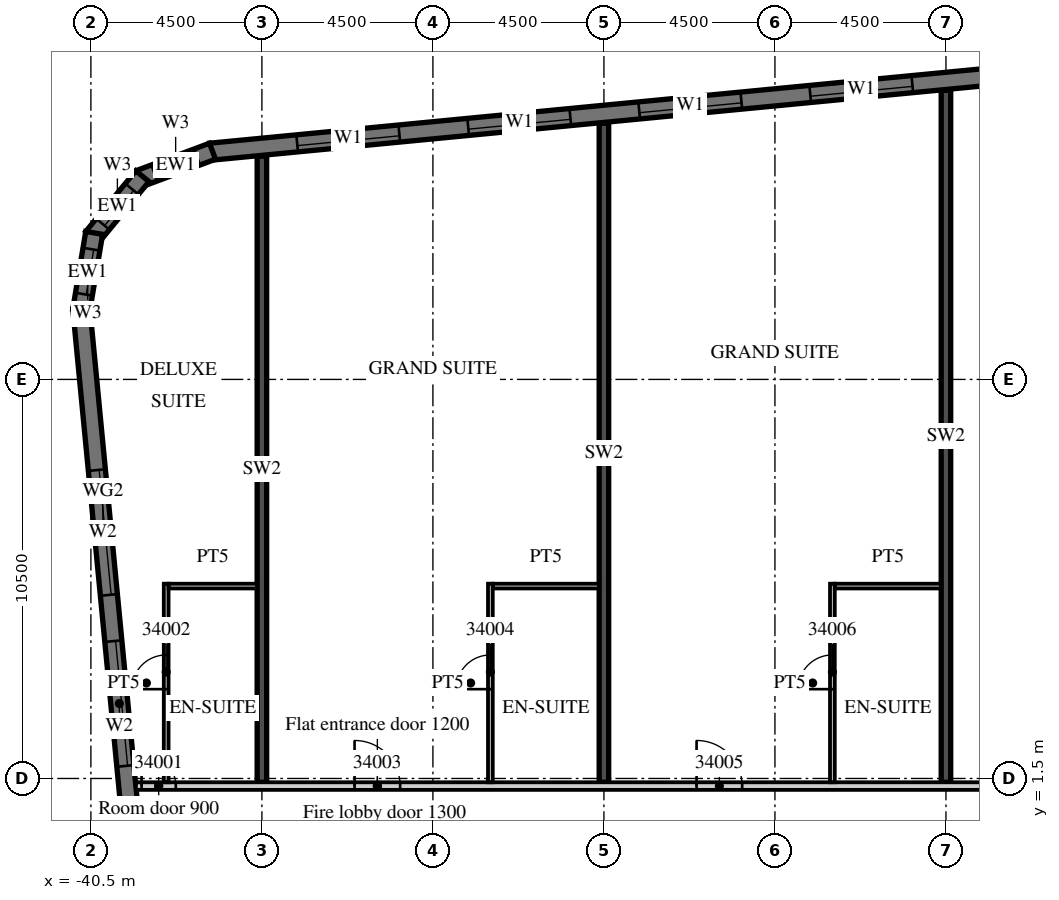
"""IFC4 building model, lengths in metres.
Left out: names, types, materials, properties, quantities, classifications, styles, units other than length and angle.
Written with IfcOpenShell. Run it as: python <this file> out.ifc"""

import sys

from ifc_helpers import new_model, si_unit, direction, frame, frame_2d, origin, place, context, subcontext, project, spatial, polyline, rectangle, outline, extrude, element, fill, save


model = new_model("IFC4")
c1 = context("Model", 3, precision=1e-05, world=origin(), true_north=direction((0.0, 1.0)))
c2 = subcontext(c1, "Body", "Model", "MODEL_VIEW")
j1 = project(units=[si_unit("LENGTHUNIT", "METRE"), si_unit("PLANEANGLEUNIT", "RADIAN")], contexts=[c1])
p1 = place(None, origin())
s1 = spatial("IfcSite", under=j1, at=p1, CompositionType="ELEMENT")
p2 = place(p1, origin())
s2 = spatial("IfcBuilding", under=s1, at=p2, CompositionType="ELEMENT")
p3 = place(p2, frame((0.0, 0.0, 147.1)))
s3 = spatial("IfcBuildingStorey", under=s2, at=p3, CompositionType="ELEMENT", Elevation=147.1)
p4 = place(p3, frame((-36.0, 1.4, 0.0), z_axis=(0.0, 0.0, 1.0), x_axis=(0.0, 1.0, 0.0)))
e1 = element("IfcWall", 1, at=p4, inside=s3, PredefinedType="SHEAR", context=c2, shape_type="SweptSolid", body=[
    extrude(rectangle(XDim=16.474, YDim=0.25, at=frame_2d((8.237, 0.0))), origin(), (0.0, 0.0, 1.0), 3.0),
])
p5 = place(p3, frame((-27.0, 1.4, 0.0), z_axis=(0.0, 0.0, 1.0), x_axis=(0.0, 1.0, 0.0)))
e2 = element("IfcWall", 2, at=p5, inside=s3, PredefinedType="SHEAR", context=c2, shape_type="SweptSolid", body=[
    extrude(rectangle(XDim=17.34, YDim=0.25, at=frame_2d((8.67, 0.0))), origin(), (0.0, 0.0, 1.0), 3.0),
])
p6 = place(p3, frame((-18.0, 1.4, 0.0), z_axis=(0.0, 0.0, 1.0), x_axis=(0.0, 1.0, 0.0)))
e3 = element("IfcWall", 3, at=p6, inside=s3, PredefinedType="SHEAR", context=c2, shape_type="SweptSolid", body=[
    extrude(rectangle(XDim=18.207, YDim=0.25, at=frame_2d((9.104, 0.0))), origin(), (0.0, 0.0, 1.0), 3.0),
])
p7 = place(p3, frame((-40.753, 13.872, 0.0), z_axis=(0.0, 0.0, 1.0), x_axis=(0.095843327381, -0.995396431878, 0.0)))
e4 = element("IfcWall", 4, at=p7, inside=s3, PredefinedType="SOLIDWALL", context=c2, shape_type="SweptSolid", body=[
    extrude(rectangle(XDim=35.0, YDim=0.45, at=frame_2d((17.5, 0.0))), origin(), (0.0, 0.0, 1.0), 3.0),
])
p8 = place(p7, frame((4.277, 0.0, 0.45)))
e5 = element("IfcOpeningElement", 5, at=p8, cuts=e4, PredefinedType="OPENING", context=c2, shape_type="SweptSolid", body=[
    extrude(rectangle(XDim=3.3, YDim=2.25, at=frame_2d((1.65, 1.125))), frame((0.0, 0.235, 0.0), z_axis=(0.0, -1.0, 0.0), x_axis=(1.0, 0.0, 0.0)), (0.0, 0.0, 1.0), 0.47),
])
p9 = place(p7, frame((8.798, 0.0, 0.45)))
e6 = element("IfcOpeningElement", 6, at=p9, cuts=e4, PredefinedType="OPENING", context=c2, shape_type="SweptSolid", body=[
    extrude(rectangle(XDim=3.3, YDim=2.25, at=frame_2d((1.65, 1.125))), frame((0.0, 0.235, 0.0), z_axis=(0.0, -1.0, 0.0), x_axis=(1.0, 0.0, 0.0)), (0.0, 0.0, 1.0), 0.47),
])
p10 = place(p3, frame((13.521, 22.89, 0.0), z_axis=(0.0, 0.0, 1.0), x_axis=(-0.995396445054, -0.095843190545, 0.0)))
e7 = element("IfcWall", 7, at=p10, inside=s3, PredefinedType="SOLIDWALL", context=c2, shape_type="SweptSolid", body=[
    extrude(rectangle(XDim=51.114, YDim=0.45, at=frame_2d((25.557, 0.0))), origin(), (0.0, 0.0, 1.0), 3.0),
])
p11 = place(p10, frame((0.91, 0.0, 0.45)))
e8 = element("IfcOpeningElement", 8, at=p11, cuts=e7, PredefinedType="OPENING", context=c2, shape_type="SweptSolid", body=[
    extrude(rectangle(XDim=2.7, YDim=2.25, at=frame_2d((1.35, 1.125))), frame((0.0, 0.235, 0.0), z_axis=(0.0, -1.0, 0.0), x_axis=(1.0, 0.0, 0.0)), (0.0, 0.0, 1.0), 0.47),
])
p12 = place(p10, frame((5.431, 0.0, 0.45)))
e9 = element("IfcOpeningElement", 9, at=p12, cuts=e7, PredefinedType="OPENING", context=c2, shape_type="SweptSolid", body=[
    extrude(rectangle(XDim=2.7, YDim=2.25, at=frame_2d((1.35, 1.125))), frame((0.0, 0.235, 0.0), z_axis=(0.0, -1.0, 0.0), x_axis=(1.0, 0.0, 0.0)), (0.0, 0.0, 1.0), 0.47),
])
p13 = place(p10, frame((9.952, 0.0, 0.45)))
e10 = element("IfcOpeningElement", 10, at=p13, cuts=e7, PredefinedType="OPENING", context=c2, shape_type="SweptSolid", body=[
    extrude(rectangle(XDim=2.7, YDim=2.25, at=frame_2d((1.35, 1.125))), frame((0.0, 0.235, 0.0), z_axis=(0.0, -1.0, 0.0), x_axis=(1.0, 0.0, 0.0)), (0.0, 0.0, 1.0), 0.47),
])
p14 = place(p10, frame((14.473, 0.0, 0.45)))
e11 = element("IfcOpeningElement", 11, at=p14, cuts=e7, PredefinedType="OPENING", context=c2, shape_type="SweptSolid", body=[
    extrude(rectangle(XDim=2.7, YDim=2.25, at=frame_2d((1.35, 1.125))), frame((0.0, 0.235, 0.0), z_axis=(0.0, -1.0, 0.0), x_axis=(1.0, 0.0, 0.0)), (0.0, 0.0, 1.0), 0.47),
])
p15 = place(p10, frame((18.994, 0.0, 0.45)))
e12 = element("IfcOpeningElement", 12, at=p15, cuts=e7, PredefinedType="OPENING", context=c2, shape_type="SweptSolid", body=[
    extrude(rectangle(XDim=2.7, YDim=2.25, at=frame_2d((1.35, 1.125))), frame((0.0, 0.235, 0.0), z_axis=(0.0, -1.0, 0.0), x_axis=(1.0, 0.0, 0.0)), (0.0, 0.0, 1.0), 0.47),
])
p16 = place(p10, frame((23.514, 0.0, 0.45)))
e13 = element("IfcOpeningElement", 13, at=p16, cuts=e7, PredefinedType="OPENING", context=c2, shape_type="SweptSolid", body=[
    extrude(rectangle(XDim=2.7, YDim=2.25, at=frame_2d((1.35, 1.125))), frame((0.0, 0.235, 0.0), z_axis=(0.0, -1.0, 0.0), x_axis=(1.0, 0.0, 0.0)), (0.0, 0.0, 1.0), 0.47),
])
p17 = place(p10, frame((28.035, 0.0, 0.45)))
e14 = element("IfcOpeningElement", 14, at=p17, cuts=e7, PredefinedType="OPENING", context=c2, shape_type="SweptSolid", body=[
    extrude(rectangle(XDim=2.7, YDim=2.25, at=frame_2d((1.35, 1.125))), frame((0.0, 0.235, 0.0), z_axis=(0.0, -1.0, 0.0), x_axis=(1.0, 0.0, 0.0)), (0.0, 0.0, 1.0), 0.47),
])
p18 = place(p10, frame((32.556, 0.0, 0.45)))
e15 = element("IfcOpeningElement", 15, at=p18, cuts=e7, PredefinedType="OPENING", context=c2, shape_type="SweptSolid", body=[
    extrude(rectangle(XDim=2.7, YDim=2.25, at=frame_2d((1.35, 1.125))), frame((0.0, 0.235, 0.0), z_axis=(0.0, -1.0, 0.0), x_axis=(1.0, 0.0, 0.0)), (0.0, 0.0, 1.0), 0.47),
])
p19 = place(p10, frame((37.077, 0.0, 0.45)))
e16 = element("IfcOpeningElement", 16, at=p19, cuts=e7, PredefinedType="OPENING", context=c2, shape_type="SweptSolid", body=[
    extrude(rectangle(XDim=2.7, YDim=2.25, at=frame_2d((1.35, 1.125))), frame((0.0, 0.235, 0.0), z_axis=(0.0, -1.0, 0.0), x_axis=(1.0, 0.0, 0.0)), (0.0, 0.0, 1.0), 0.47),
])
p20 = place(p10, frame((41.598, 0.0, 0.45)))
e17 = element("IfcOpeningElement", 17, at=p20, cuts=e7, PredefinedType="OPENING", context=c2, shape_type="SweptSolid", body=[
    extrude(rectangle(XDim=2.7, YDim=2.25, at=frame_2d((1.35, 1.125))), frame((0.0, 0.235, 0.0), z_axis=(0.0, -1.0, 0.0), x_axis=(1.0, 0.0, 0.0)), (0.0, 0.0, 1.0), 0.47),
])
p21 = place(p10, frame((46.118, 0.0, 0.45)))
e18 = element("IfcOpeningElement", 18, at=p21, cuts=e7, PredefinedType="OPENING", context=c2, shape_type="SweptSolid", body=[
    extrude(rectangle(XDim=2.7, YDim=2.25, at=frame_2d((1.35, 1.125))), frame((0.0, 0.235, 0.0), z_axis=(0.0, -1.0, 0.0), x_axis=(1.0, 0.0, 0.0)), (0.0, 0.0, 1.0), 0.47),
])
p22 = place(p3, frame((-37.3, 18.004, 0.0), z_axis=(0.0, 0.0, 1.0), x_axis=(-0.936677599948, -0.350192909346, 0.0)))
e19 = element("IfcWall", 19, at=p22, inside=s3, PredefinedType="SOLIDWALL", context=c2, shape_type="SweptSolid", body=[
    extrude(outline(polyline([(0.0, -0.225), (2.071, -0.225), (1.95, 0.225), (0.121, 0.225), (0.0, -0.225)])), origin(), (0.0, 0.0, 1.0), 3.0),
])
p23 = place(p22, frame((0.435, 0.0, 0.45)))
e20 = element("IfcOpeningElement", 20, at=p23, cuts=e19, PredefinedType="OPENING", context=c2, shape_type="SweptSolid", body=[
    extrude(rectangle(XDim=1.2, YDim=2.25, at=frame_2d((0.6, 1.125))), frame((0.0, 0.235, 0.0), z_axis=(0.0, -1.0, 0.0), x_axis=(1.0, 0.0, 0.0)), (0.0, 0.0, 1.0), 0.47),
])
p24 = place(p3, frame((-39.145, 17.347, 0.0), z_axis=(0.0, 0.0, 1.0), x_axis=(-0.636046112757, -0.771651049663, 0.0)))
e21 = element("IfcWall", 21, at=p24, inside=s3, PredefinedType="SOLIDWALL", context=c2, shape_type="SweptSolid", body=[
    extrude(outline(polyline([(0.0, -0.225), (2.071, -0.225), (1.95, 0.225), (0.121, 0.225), (0.0, -0.225)])), origin(), (0.0, 0.0, 1.0), 3.0),
])
p25 = place(p24, frame((0.435, 0.0, 0.45)))
e22 = element("IfcOpeningElement", 22, at=p25, cuts=e21, PredefinedType="OPENING", context=c2, shape_type="SweptSolid", body=[
    extrude(rectangle(XDim=1.2, YDim=2.25, at=frame_2d((0.6, 1.125))), frame((0.0, 0.235, 0.0), z_axis=(0.0, -1.0, 0.0), x_axis=(1.0, 0.0, 0.0)), (0.0, 0.0, 1.0), 0.47),
])
p26 = place(p3, frame((-40.413, 15.855, 0.0), z_axis=(0.0, 0.0, 1.0), x_axis=(-0.165068144653, -0.986282164302, 0.0)))
e23 = element("IfcWall", 23, at=p26, inside=s3, PredefinedType="SOLIDWALL", context=c2, shape_type="SweptSolid", body=[
    extrude(outline(polyline([(0.0, -0.225), (2.071, -0.225), (1.95, 0.225), (0.121, 0.225), (0.0, -0.225)])), origin(), (0.0, 0.0, 1.0), 3.0),
])
p27 = place(p26, frame((0.435, 0.0, 0.45)))
e24 = element("IfcOpeningElement", 24, at=p27, cuts=e23, PredefinedType="OPENING", context=c2, shape_type="SweptSolid", body=[
    extrude(rectangle(XDim=1.2, YDim=2.25, at=frame_2d((0.6, 1.125))), frame((0.0, 0.235, 0.0), z_axis=(0.0, -1.0, 0.0), x_axis=(1.0, 0.0, 0.0)), (0.0, 0.0, 1.0), 0.47),
])
p28 = place(p3, frame((-39.316, 1.3, 0.0), z_axis=(0.0, 0.0, 1.0), x_axis=(1.0, 0.0, 0.0)))
e25 = element("IfcWall", 25, at=p28, inside=s3, PredefinedType="PARTITIONING", context=c2, shape_type="SweptSolid", body=[
    extrude(rectangle(XDim=52.816, YDim=0.2, at=frame_2d((26.408, 0.0))), origin(), (0.0, 0.0, 1.0), 3.0),
])
p29 = place(p28, frame((0.15, 0.0, 0.0)))
e26 = element("IfcOpeningElement", 26, at=p29, cuts=e25, PredefinedType="OPENING", context=c2, shape_type="SweptSolid", body=[
    extrude(rectangle(XDim=0.9, YDim=2.1, at=frame_2d((0.45, 1.05))), frame((0.0, 0.11, 0.0), z_axis=(0.0, -1.0, 0.0), x_axis=(1.0, 0.0, 0.0)), (0.0, 0.0, 1.0), 0.22),
])
p30 = place(p28, frame((5.754, 0.0, 0.0)))
e27 = element("IfcOpeningElement", 27, at=p30, cuts=e25, PredefinedType="OPENING", context=c2, shape_type="SweptSolid", body=[
    extrude(rectangle(XDim=1.2, YDim=2.1, at=frame_2d((0.6, 1.05))), frame((0.0, 0.11, 0.0), z_axis=(0.0, -1.0, 0.0), x_axis=(1.0, 0.0, 0.0)), (0.0, 0.0, 1.0), 0.22),
])
p31 = place(p28, frame((14.754, 0.0, 0.0)))
e28 = element("IfcOpeningElement", 28, at=p31, cuts=e25, PredefinedType="OPENING", context=c2, shape_type="SweptSolid", body=[
    extrude(rectangle(XDim=1.2, YDim=2.1, at=frame_2d((0.6, 1.05))), frame((0.0, 0.11, 0.0), z_axis=(0.0, -1.0, 0.0), x_axis=(1.0, 0.0, 0.0)), (0.0, 0.0, 1.0), 0.22),
])
p32 = place(p28, frame((23.754, 0.0, 0.0)))
e29 = element("IfcOpeningElement", 29, at=p32, cuts=e25, PredefinedType="OPENING", context=c2, shape_type="SweptSolid", body=[
    extrude(rectangle(XDim=1.2, YDim=2.1, at=frame_2d((0.6, 1.05))), frame((0.0, 0.11, 0.0), z_axis=(0.0, -1.0, 0.0), x_axis=(1.0, 0.0, 0.0)), (0.0, 0.0, 1.0), 0.22),
])
p33 = place(p28, frame((35.678, 0.0, 0.0)))
e30 = element("IfcOpeningElement", 30, at=p33, cuts=e25, PredefinedType="OPENING", context=c2, shape_type="SweptSolid", body=[
    extrude(rectangle(XDim=1.2, YDim=2.1, at=frame_2d((0.6, 1.05))), frame((0.0, 0.11, 0.0), z_axis=(0.0, -1.0, 0.0), x_axis=(1.0, 0.0, 0.0)), (0.0, 0.0, 1.0), 0.22),
])
p34 = place(p28, frame((44.678, 0.0, 0.0)))
e31 = element("IfcOpeningElement", 31, at=p34, cuts=e25, PredefinedType="OPENING", context=c2, shape_type="SweptSolid", body=[
    extrude(rectangle(XDim=1.2, YDim=2.1, at=frame_2d((0.6, 1.05))), frame((0.0, 0.11, 0.0), z_axis=(0.0, -1.0, 0.0), x_axis=(1.0, 0.0, 0.0)), (0.0, 0.0, 1.0), 0.22),
])
p35 = place(p28, frame((51.241, 0.0, 0.0)))
e32 = element("IfcOpeningElement", 32, at=p35, cuts=e25, PredefinedType="OPENING", context=c2, shape_type="SweptSolid", body=[
    extrude(rectangle(XDim=1.0, YDim=2.1, at=frame_2d((0.5, 1.05))), frame((0.0, 0.11, 0.0), z_axis=(0.0, -1.0, 0.0), x_axis=(1.0, 0.0, 0.0)), (0.0, 0.0, 1.0), 0.22),
])
p36 = place(p3, frame((-38.519, 1.4, 0.0), z_axis=(0.0, 0.0, 1.0), x_axis=(0.0, 1.0, 0.0)))
e33 = element("IfcWall", 33, at=p36, inside=s3, PredefinedType="PARTITIONING", context=c2, shape_type="SweptSolid", body=[
    extrude(rectangle(XDim=5.225, YDim=0.125, at=frame_2d((2.613, 0.0))), origin(), (0.0, 0.0, 1.0), 3.0),
])
p37 = place(p36, frame((2.45, 0.0, 0.0)))
e34 = element("IfcOpeningElement", 34, at=p37, cuts=e33, PredefinedType="OPENING", context=c2, shape_type="SweptSolid", body=[
    extrude(rectangle(XDim=0.9, YDim=2.1, at=frame_2d((0.45, 1.05))), frame((0.0, 0.073, 0.0), z_axis=(0.0, -1.0, 0.0), x_axis=(1.0, 0.0, 0.0)), (0.0, 0.0, 1.0), 0.145),
])
p38 = place(p3, frame((-38.457, 6.562, 0.0), z_axis=(0.0, 0.0, 1.0), x_axis=(1.0, 0.0, 0.0)))
e35 = element("IfcWall", 35, at=p38, inside=s3, PredefinedType="PARTITIONING", context=c2, shape_type="SweptSolid", body=[
    extrude(rectangle(XDim=2.332, YDim=0.125, at=frame_2d((1.166, 0.0))), origin(), (0.0, 0.0, 1.0), 3.0),
])
p39 = place(p3, frame((-29.988, 1.4, 0.0), z_axis=(0.0, 0.0, 1.0), x_axis=(0.0, 1.0, 0.0)))
e36 = element("IfcWall", 36, at=p39, inside=s3, PredefinedType="PARTITIONING", context=c2, shape_type="SweptSolid", body=[
    extrude(rectangle(XDim=5.225, YDim=0.125, at=frame_2d((2.613, 0.0))), origin(), (0.0, 0.0, 1.0), 3.0),
])
p40 = place(p39, frame((2.45, 0.0, 0.0)))
e37 = element("IfcOpeningElement", 37, at=p40, cuts=e36, PredefinedType="OPENING", context=c2, shape_type="SweptSolid", body=[
    extrude(rectangle(XDim=0.9, YDim=2.1, at=frame_2d((0.45, 1.05))), frame((0.0, 0.073, 0.0), z_axis=(0.0, -1.0, 0.0), x_axis=(1.0, 0.0, 0.0)), (0.0, 0.0, 1.0), 0.145),
])
p41 = place(p3, frame((-29.925, 6.562, 0.0), z_axis=(0.0, 0.0, 1.0), x_axis=(1.0, 0.0, 0.0)))
e38 = element("IfcWall", 38, at=p41, inside=s3, PredefinedType="PARTITIONING", context=c2, shape_type="SweptSolid", body=[
    extrude(rectangle(XDim=2.8, YDim=0.125, at=frame_2d((1.4, 0.0))), origin(), (0.0, 0.0, 1.0), 3.0),
])
p42 = place(p3, frame((-20.988, 1.4, 0.0), z_axis=(0.0, 0.0, 1.0), x_axis=(0.0, 1.0, 0.0)))
e39 = element("IfcWall", 39, at=p42, inside=s3, PredefinedType="PARTITIONING", context=c2, shape_type="SweptSolid", body=[
    extrude(rectangle(XDim=5.225, YDim=0.125, at=frame_2d((2.613, 0.0))), origin(), (0.0, 0.0, 1.0), 3.0),
])
p43 = place(p42, frame((2.45, 0.0, 0.0)))
e40 = element("IfcOpeningElement", 40, at=p43, cuts=e39, PredefinedType="OPENING", context=c2, shape_type="SweptSolid", body=[
    extrude(rectangle(XDim=0.9, YDim=2.1, at=frame_2d((0.45, 1.05))), frame((0.0, 0.073, 0.0), z_axis=(0.0, -1.0, 0.0), x_axis=(1.0, 0.0, 0.0)), (0.0, 0.0, 1.0), 0.145),
])
p44 = place(p3, frame((-20.925, 6.562, 0.0), z_axis=(0.0, 0.0, 1.0), x_axis=(1.0, 0.0, 0.0)))
e41 = element("IfcWall", 41, at=p44, inside=s3, PredefinedType="PARTITIONING", context=c2, shape_type="SweptSolid", body=[
    extrude(rectangle(XDim=2.8, YDim=0.125, at=frame_2d((1.4, 0.0))), origin(), (0.0, 0.0, 1.0), 3.0),
])
p45 = place(p8, origin())
e42 = element("IfcWindow", 42, at=p45, inside=s3, PartitioningType="SINGLE_PANEL", PredefinedType="WINDOW", context=c2, shape_type="SweptSolid", body=[
    extrude(rectangle(XDim=3.3, YDim=2.25, at=frame_2d((1.65, 1.125))), frame((0.0, 0.09, 0.0), z_axis=(0.0, -1.0, 0.0), x_axis=(1.0, 0.0, 0.0)), (0.0, 0.0, 1.0), 0.06),
])
fill(e5, e42)
p46 = place(p9, origin())
e43 = element("IfcWindow", 43, at=p46, inside=s3, PartitioningType="SINGLE_PANEL", PredefinedType="WINDOW", context=c2, shape_type="SweptSolid", body=[
    extrude(rectangle(XDim=3.3, YDim=2.25, at=frame_2d((1.65, 1.125))), frame((0.0, 0.09, 0.0), z_axis=(0.0, -1.0, 0.0), x_axis=(1.0, 0.0, 0.0)), (0.0, 0.0, 1.0), 0.06),
])
fill(e6, e43)
p47 = place(p18, origin())
e44 = element("IfcWindow", 44, at=p47, inside=s3, PartitioningType="SINGLE_PANEL", PredefinedType="WINDOW", context=c2, shape_type="SweptSolid", body=[
    extrude(rectangle(XDim=2.7, YDim=2.25, at=frame_2d((1.35, 1.125))), frame((0.0, 0.09, 0.0), z_axis=(0.0, -1.0, 0.0), x_axis=(1.0, 0.0, 0.0)), (0.0, 0.0, 1.0), 0.06),
])
fill(e15, e44)
p48 = place(p19, origin())
e45 = element("IfcWindow", 45, at=p48, inside=s3, PartitioningType="SINGLE_PANEL", PredefinedType="WINDOW", context=c2, shape_type="SweptSolid", body=[
    extrude(rectangle(XDim=2.7, YDim=2.25, at=frame_2d((1.35, 1.125))), frame((0.0, 0.09, 0.0), z_axis=(0.0, -1.0, 0.0), x_axis=(1.0, 0.0, 0.0)), (0.0, 0.0, 1.0), 0.06),
])
fill(e16, e45)
p49 = place(p20, origin())
e46 = element("IfcWindow", 46, at=p49, inside=s3, PartitioningType="SINGLE_PANEL", PredefinedType="WINDOW", context=c2, shape_type="SweptSolid", body=[
    extrude(rectangle(XDim=2.7, YDim=2.25, at=frame_2d((1.35, 1.125))), frame((0.0, 0.09, 0.0), z_axis=(0.0, -1.0, 0.0), x_axis=(1.0, 0.0, 0.0)), (0.0, 0.0, 1.0), 0.06),
])
fill(e17, e46)
p50 = place(p21, origin())
e47 = element("IfcWindow", 47, at=p50, inside=s3, PartitioningType="SINGLE_PANEL", PredefinedType="WINDOW", context=c2, shape_type="SweptSolid", body=[
    extrude(rectangle(XDim=2.7, YDim=2.25, at=frame_2d((1.35, 1.125))), frame((0.0, 0.09, 0.0), z_axis=(0.0, -1.0, 0.0), x_axis=(1.0, 0.0, 0.0)), (0.0, 0.0, 1.0), 0.06),
])
fill(e18, e47)
p51 = place(p23, origin())
e48 = element("IfcWindow", 48, at=p51, inside=s3, PartitioningType="SINGLE_PANEL", PredefinedType="WINDOW", context=c2, shape_type="SweptSolid", body=[
    extrude(rectangle(XDim=1.2, YDim=2.25, at=frame_2d((0.6, 1.125))), frame((0.0, 0.09, 0.0), z_axis=(0.0, -1.0, 0.0), x_axis=(1.0, 0.0, 0.0)), (0.0, 0.0, 1.0), 0.06),
])
fill(e20, e48)
p52 = place(p25, origin())
e49 = element("IfcWindow", 49, at=p52, inside=s3, PartitioningType="SINGLE_PANEL", PredefinedType="WINDOW", context=c2, shape_type="SweptSolid", body=[
    extrude(rectangle(XDim=1.2, YDim=2.25, at=frame_2d((0.6, 1.125))), frame((0.0, 0.09, 0.0), z_axis=(0.0, -1.0, 0.0), x_axis=(1.0, 0.0, 0.0)), (0.0, 0.0, 1.0), 0.06),
])
fill(e22, e49)
p53 = place(p27, origin())
e50 = element("IfcWindow", 50, at=p53, inside=s3, PartitioningType="SINGLE_PANEL", PredefinedType="WINDOW", context=c2, shape_type="SweptSolid", body=[
    extrude(rectangle(XDim=1.2, YDim=2.25, at=frame_2d((0.6, 1.125))), frame((0.0, 0.09, 0.0), z_axis=(0.0, -1.0, 0.0), x_axis=(1.0, 0.0, 0.0)), (0.0, 0.0, 1.0), 0.06),
])
fill(e24, e50)
p54 = place(p29, origin())
e51 = element("IfcDoor", 51, at=p54, inside=s3, OperationType="SINGLE_SWING_LEFT", PredefinedType="DOOR", context=c2, shape_type="SweptSolid", body=[
    extrude(rectangle(XDim=0.9, YDim=2.1, at=frame_2d((0.45, 1.05))), frame((0.0, 0.025, 0.0), z_axis=(0.0, -1.0, 0.0), x_axis=(1.0, 0.0, 0.0)), (0.0, 0.0, 1.0), 0.05),
])
fill(e26, e51)
p55 = place(p37, origin())
e52 = element("IfcDoor", 52, at=p55, inside=s3, OperationType="SINGLE_SWING_LEFT", PredefinedType="DOOR", context=c2, shape_type="SweptSolid", body=[
    extrude(rectangle(XDim=0.9, YDim=2.1, at=frame_2d((0.45, 1.05))), frame((0.0, 0.025, 0.0), z_axis=(0.0, -1.0, 0.0), x_axis=(1.0, 0.0, 0.0)), (0.0, 0.0, 1.0), 0.05),
])
fill(e34, e52)
p56 = place(p30, origin())
e53 = element("IfcDoor", 53, at=p56, inside=s3, OperationType="SINGLE_SWING_LEFT", PredefinedType="DOOR", context=c2, shape_type="SweptSolid", body=[
    extrude(rectangle(XDim=1.2, YDim=2.1, at=frame_2d((0.6, 1.05))), frame((0.0, 0.025, 0.0), z_axis=(0.0, -1.0, 0.0), x_axis=(1.0, 0.0, 0.0)), (0.0, 0.0, 1.0), 0.05),
])
fill(e27, e53)
p57 = place(p40, origin())
e54 = element("IfcDoor", 54, at=p57, inside=s3, OperationType="SINGLE_SWING_LEFT", PredefinedType="DOOR", context=c2, shape_type="SweptSolid", body=[
    extrude(rectangle(XDim=0.9, YDim=2.1, at=frame_2d((0.45, 1.05))), frame((0.0, 0.025, 0.0), z_axis=(0.0, -1.0, 0.0), x_axis=(1.0, 0.0, 0.0)), (0.0, 0.0, 1.0), 0.05),
])
fill(e37, e54)
p58 = place(p31, origin())
e55 = element("IfcDoor", 55, at=p58, inside=s3, OperationType="SINGLE_SWING_LEFT", PredefinedType="DOOR", context=c2, shape_type="SweptSolid", body=[
    extrude(rectangle(XDim=1.2, YDim=2.1, at=frame_2d((0.6, 1.05))), frame((0.0, 0.025, 0.0), z_axis=(0.0, -1.0, 0.0), x_axis=(1.0, 0.0, 0.0)), (0.0, 0.0, 1.0), 0.05),
])
fill(e28, e55)
p59 = place(p43, origin())
e56 = element("IfcDoor", 56, at=p59, inside=s3, OperationType="SINGLE_SWING_LEFT", PredefinedType="DOOR", context=c2, shape_type="SweptSolid", body=[
    extrude(rectangle(XDim=0.9, YDim=2.1, at=frame_2d((0.45, 1.05))), frame((0.0, 0.025, 0.0), z_axis=(0.0, -1.0, 0.0), x_axis=(1.0, 0.0, 0.0)), (0.0, 0.0, 1.0), 0.05),
])
fill(e40, e56)
save(model, sys.argv[1])
